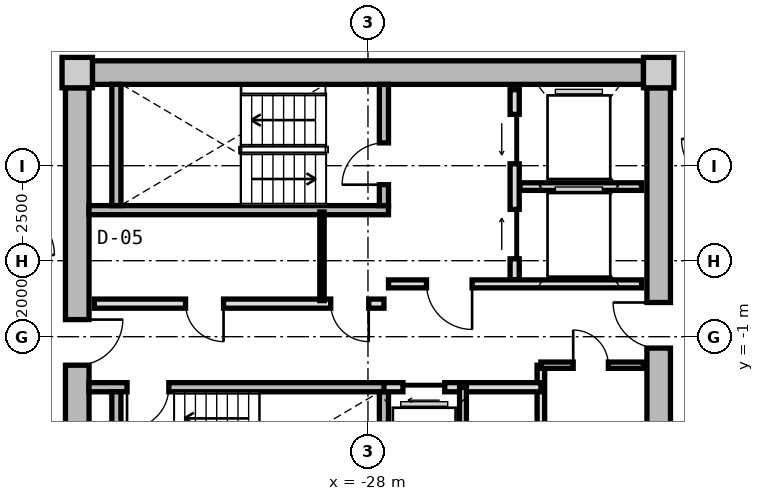
"""IFC4 building model, lengths in metres.
Left out: names, types, materials, properties, quantities, classifications, styles, units other than length and angle.
Written with IfcOpenShell. Run it as: python <this file> out.ifc"""

import sys

from ifc_helpers import new_model, si_unit, direction, frame, frame_2d, origin, origin_2d, place, context, subcontext, project, spatial, rectangle, extrude, source, transform, mapped, element, fill, save


model = new_model("IFC4")
c1 = context("Model", 3, precision=1e-05, world=origin(), true_north=direction((0.0, 1.0)))
c2 = subcontext(c1, "Body", "Model", "MODEL_VIEW")
j1 = project(units=[si_unit("LENGTHUNIT", "METRE"), si_unit("PLANEANGLEUNIT", "RADIAN")], contexts=[c1])
p1 = place(None, origin())
s1 = spatial("IfcSite", under=j1, at=p1, CompositionType="ELEMENT")
p2 = place(p1, origin())
s2 = spatial("IfcBuilding", under=s1, at=p2, CompositionType="ELEMENT")
p3 = place(p2, frame((0.0, 0.0, 137.35)))
s3 = spatial("IfcBuildingStorey", under=s2, at=p3, CompositionType="ELEMENT", Elevation=137.35)
m1 = source(origin(), c2, "Body", "SweptSolid", [
    extrude(rectangle(XDim=0.8, YDim=0.8, at=origin_2d()), origin(), (0.0, 0.0, 1.0), 3.05),
])
for number, where, z_axis, x_axis in (
    (1, (-20.35, 5.95, 0.0), (0.0, 0.0, 1.0), (1.0, 0.0, 0.0)),
    (2, (-35.65, 5.95, 0.0), (0.0, 0.0, 1.0), (1.0, 0.0, 0.0)),
):
    element("IfcColumn", number, at=place(p3, frame(where, z_axis=z_axis, x_axis=x_axis)), inside=s3, PredefinedType="COLUMN", context=c2, shape_type="MappedRepresentation", body=[
        mapped(m1, transform((0.0, 0.0, 0.0), x_axis=(1.0, 0.0, 0.0), y_axis=(0.0, 1.0, 0.0), z_axis=(0.0, 0.0, 1.0), scale=1.0)),
    ])
m2 = source(origin(), c2, "Body", "SweptSolid", [
    extrude(rectangle(XDim=14.5, YDim=0.62, at=frame_2d((7.25, 0.0))), origin(), (0.0, 0.0, 1.0), 2.81),
])
p4 = place(p3, frame((-35.25, 5.95, 0.0), z_axis=(0.0, 0.0, 1.0), x_axis=(1.0, 0.0, 0.0)))
e3 = element("IfcWall", 3, at=p4, inside=s3, PredefinedType="SHEAR", context=c2, shape_type="MappedRepresentation", body=[
    mapped(m2, transform((0.0, 0.0, 0.0), x_axis=(1.0, 0.0, 0.0), y_axis=(0.0, 1.0, 0.0), z_axis=(0.0, 0.0, 1.0), scale=1.0)),
])
m3 = source(origin(), c2, "Body", "SweptSolid", [
    extrude(rectangle(XDim=11.1, YDim=0.62, at=frame_2d((5.55, 0.0))), origin(), (0.0, 0.0, 1.0), 2.81),
])
p5 = place(p3, frame((-35.65, -5.55, 0.0), z_axis=(0.0, 0.0, 1.0), x_axis=(0.0, 1.0, 0.0)))
e4 = element("IfcWall", 4, at=p5, inside=s3, PredefinedType="SHEAR", context=c2, shape_type="MappedRepresentation", body=[
    mapped(m3, transform((0.0, 0.0, 0.0), x_axis=(1.0, 0.0, 0.0), y_axis=(0.0, 1.0, 0.0), z_axis=(0.0, 0.0, 1.0), scale=1.0)),
])
p6 = place(p5, frame((3.8, 0.0, 0.0)))
e5 = element("IfcOpeningElement", 5, at=p6, cuts=e4, PredefinedType="OPENING", context=c2, shape_type="SweptSolid", body=[
    extrude(rectangle(XDim=1.2, YDim=2.15, at=frame_2d((0.6, 1.075))), frame((0.0, 0.32, 0.0), z_axis=(0.0, -1.0, 0.0), x_axis=(1.0, 0.0, 0.0)), (0.0, 0.0, 1.0), 0.64),
])
p7 = place(p3, frame((-20.35, 5.55, 0.0), z_axis=(0.0, 0.0, 1.0), x_axis=(0.0, -1.0, 0.0)))
e6 = element("IfcWall", 6, at=p7, inside=s3, PredefinedType="SHEAR", context=c2, shape_type="MappedRepresentation", body=[
    mapped(m3, transform((0.0, 0.0, 0.0), x_axis=(1.0, 0.0, 0.0), y_axis=(0.0, 1.0, 0.0), z_axis=(0.0, 0.0, 1.0), scale=1.0)),
])
p8 = place(p7, frame((5.65, 0.0, 0.0)))
e7 = element("IfcOpeningElement", 7, at=p8, cuts=e6, PredefinedType="OPENING", context=c2, shape_type="SweptSolid", body=[
    extrude(rectangle(XDim=1.2, YDim=2.15, at=frame_2d((0.6, 1.075))), frame((0.0, 0.32, 0.0), z_axis=(0.0, -1.0, 0.0), x_axis=(1.0, 0.0, 0.0)), (0.0, 0.0, 1.0), 0.64),
])
m4 = source(origin(), c2, "Body", "SweptSolid", [
    extrude(rectangle(XDim=7.88, YDim=0.24, at=frame_2d((3.94, 0.0))), origin(), (0.0, 0.0, 1.0), 2.81),
])
p9 = place(p3, frame((-35.34, 2.33, 0.0), z_axis=(0.0, 0.0, 1.0), x_axis=(1.0, 0.0, 0.0)))
e8 = element("IfcWall", 8, at=p9, inside=s3, PredefinedType="PARTITIONING", context=c2, shape_type="MappedRepresentation", body=[
    mapped(m4, transform((0.0, 0.0, 0.0), x_axis=(1.0, 0.0, 0.0), y_axis=(0.0, 1.0, 0.0), z_axis=(0.0, 0.0, 1.0), scale=1.0)),
])
m5 = source(origin(), c2, "Body", "SweptSolid", [
    extrude(rectangle(XDim=3.19, YDim=0.24, at=frame_2d((1.595, 0.0))), origin(), (0.0, 0.0, 1.0), 2.81),
])
p10 = place(p3, frame((-34.62, 2.45, 0.0), z_axis=(0.0, 0.0, 1.0), x_axis=(0.0, 1.0, 0.0)))
e9 = element("IfcWall", 9, at=p10, inside=s3, PredefinedType="PARTITIONING", context=c2, shape_type="MappedRepresentation", body=[
    mapped(m5, transform((0.0, 0.0, 0.0), x_axis=(1.0, 0.0, 0.0), y_axis=(0.0, 1.0, 0.0), z_axis=(0.0, 0.0, 1.0), scale=1.0)),
])
p11 = place(p3, frame((-27.58, 2.45, 0.0), z_axis=(0.0, 0.0, 1.0), x_axis=(0.0, 1.0, 0.0)))
e10 = element("IfcWall", 10, at=p11, inside=s3, PredefinedType="PARTITIONING", context=c2, shape_type="MappedRepresentation", body=[
    mapped(m5, transform((0.0, 0.0, 0.0), x_axis=(1.0, 0.0, 0.0), y_axis=(0.0, 1.0, 0.0), z_axis=(0.0, 0.0, 1.0), scale=1.0)),
])
p12 = place(p11, frame((0.55, 0.0, 0.0)))
e11 = element("IfcOpeningElement", 11, at=p12, cuts=e10, PredefinedType="OPENING", context=c2, shape_type="SweptSolid", body=[
    extrude(rectangle(XDim=1.1, YDim=2.15, at=frame_2d((0.55, 1.075))), frame((0.0, 0.13, 0.0), z_axis=(0.0, -1.0, 0.0), x_axis=(1.0, 0.0, 0.0)), (0.0, 0.0, 1.0), 0.26),
])
p13 = place(p3, frame((-35.34, -2.33, 0.0), z_axis=(0.0, 0.0, 1.0), x_axis=(1.0, 0.0, 0.0)))
e12 = element("IfcWall", 12, at=p13, inside=s3, PredefinedType="PARTITIONING", context=c2, shape_type="MappedRepresentation", body=[
    mapped(m4, transform((0.0, 0.0, 0.0), x_axis=(1.0, 0.0, 0.0), y_axis=(0.0, 1.0, 0.0), z_axis=(0.0, 0.0, 1.0), scale=1.0)),
])
p14 = place(p13, frame((1.0, 0.0, 0.0)))
e13 = element("IfcOpeningElement", 13, at=p14, cuts=e12, PredefinedType="OPENING", context=c2, shape_type="SweptSolid", body=[
    extrude(rectangle(XDim=1.1, YDim=2.15, at=frame_2d((0.55, 1.075))), frame((0.0, 0.13, 0.0), z_axis=(0.0, -1.0, 0.0), x_axis=(1.0, 0.0, 0.0)), (0.0, 0.0, 1.0), 0.26),
])
for number, where, z_axis, x_axis in (
    (14, (-34.62, -5.64, 0.0), (0.0, 0.0, 1.0), (0.0, 1.0, 0.0)),
    (15, (-27.58, -5.64, 0.0), (0.0, 0.0, 1.0), (0.0, 1.0, 0.0)),
):
    element("IfcWall", number, at=place(p3, frame(where, z_axis=z_axis, x_axis=x_axis)), inside=s3, PredefinedType="PARTITIONING", context=c2, shape_type="MappedRepresentation", body=[
        mapped(m5, transform((0.0, 0.0, 0.0), x_axis=(1.0, 0.0, 0.0), y_axis=(0.0, 1.0, 0.0), z_axis=(0.0, 0.0, 1.0), scale=1.0)),
    ])
m6 = source(origin(), c2, "Body", "SweptSolid", [
    extrude(rectangle(XDim=5.0, YDim=0.24, at=frame_2d((2.5, 0.0))), origin(), (0.0, 0.0, 1.0), 2.795),
])
p15 = place(p3, frame((-24.14, 0.5, 0.0), z_axis=(0.0, 0.0, 1.0), x_axis=(0.0, 1.0, 0.0)))
e16 = element("IfcWall", 16, at=p15, inside=s3, PredefinedType="PARTITIONING", context=c2, shape_type="MappedRepresentation", body=[
    mapped(m6, transform((0.0, 0.0, 0.0), x_axis=(1.0, 0.0, 0.0), y_axis=(0.0, 1.0, 0.0), z_axis=(0.0, 0.0, 1.0), scale=1.0)),
])
p16 = place(p15, frame((3.05, 0.0, 0.0)))
e17 = element("IfcOpeningElement", 17, at=p16, cuts=e16, PredefinedType="OPENING", context=c2, shape_type="SweptSolid", body=[
    extrude(rectangle(XDim=1.3, YDim=2.2, at=frame_2d((0.65, 1.1))), frame((0.0, 0.13, 0.0), z_axis=(0.0, -1.0, 0.0), x_axis=(1.0, 0.0, 0.0)), (0.0, 0.0, 1.0), 0.26),
])
p17 = place(p15, frame((0.55, 0.0, 0.0)))
e18 = element("IfcOpeningElement", 18, at=p17, cuts=e16, PredefinedType="OPENING", context=c2, shape_type="SweptSolid", body=[
    extrude(rectangle(XDim=1.3, YDim=2.2, at=frame_2d((0.65, 1.1))), frame((0.0, 0.13, 0.0), z_axis=(0.0, -1.0, 0.0), x_axis=(1.0, 0.0, 0.0)), (0.0, 0.0, 1.0), 0.26),
])
m7 = source(origin(), c2, "Body", "SweptSolid", [
    extrude(rectangle(XDim=3.2, YDim=0.2, at=frame_2d((1.6, 0.0))), origin(), (0.0, 0.0, 1.0), 2.795),
])
p18 = place(p3, frame((-24.0, 2.95, 0.0), z_axis=(0.0, 0.0, 1.0), x_axis=(1.0, 0.0, 0.0)))
e19 = element("IfcWall", 19, at=p18, inside=s3, PredefinedType="PARTITIONING", context=c2, shape_type="MappedRepresentation", body=[
    mapped(m7, transform((0.0, 0.0, 0.0), x_axis=(1.0, 0.0, 0.0), y_axis=(0.0, 1.0, 0.0), z_axis=(0.0, 0.0, 1.0), scale=1.0)),
])
m8 = source(origin(), c2, "Body", "SweptSolid", [
    extrude(rectangle(XDim=6.66, YDim=0.21, at=frame_2d((3.33, 0.0))), origin(), (0.0, 0.0, 1.0), 2.795),
])
p19 = place(p3, frame((-27.46, 0.39, 0.0), z_axis=(0.0, 0.0, 1.0), x_axis=(1.0, 0.0, 0.0)))
e20 = element("IfcWall", 20, at=p19, inside=s3, PredefinedType="PARTITIONING", context=c2, shape_type="MappedRepresentation", body=[
    mapped(m8, transform((0.0, 0.0, 0.0), x_axis=(1.0, 0.0, 0.0), y_axis=(0.0, 1.0, 0.0), z_axis=(0.0, 0.0, 1.0), scale=1.0)),
])
p20 = place(p19, frame((1.0, 0.0, 0.0)))
e21 = element("IfcOpeningElement", 21, at=p20, cuts=e20, PredefinedType="OPENING", context=c2, shape_type="SweptSolid", body=[
    extrude(rectangle(XDim=1.2, YDim=2.15, at=frame_2d((0.6, 1.075))), frame((0.0, 0.115, 0.0), z_axis=(0.0, -1.0, 0.0), x_axis=(1.0, 0.0, 0.0)), (0.0, 0.0, 1.0), 0.23),
])
m9 = source(origin(), c2, "Body", "SweptSolid", [
    extrude(rectangle(XDim=7.62, YDim=0.24, at=frame_2d((3.81, 0.0))), origin(), (0.0, 0.0, 1.0), 2.795),
])
p21 = place(p3, frame((-35.2, -0.13, 0.0), z_axis=(0.0, 0.0, 1.0), x_axis=(1.0, 0.0, 0.0)))
e22 = element("IfcWall", 22, at=p21, inside=s3, PredefinedType="PARTITIONING", context=c2, shape_type="MappedRepresentation", body=[
    mapped(m9, transform((0.0, 0.0, 0.0), x_axis=(1.0, 0.0, 0.0), y_axis=(0.0, 1.0, 0.0), z_axis=(0.0, 0.0, 1.0), scale=1.0)),
])
p22 = place(p21, frame((6.22, 0.0, 0.0)))
e23 = element("IfcOpeningElement", 23, at=p22, cuts=e22, PredefinedType="OPENING", context=c2, shape_type="SweptSolid", body=[
    extrude(rectangle(XDim=1.0, YDim=2.1, at=frame_2d((0.5, 1.05))), frame((0.0, 0.13, 0.0), z_axis=(0.0, -1.0, 0.0), x_axis=(1.0, 0.0, 0.0)), (0.0, 0.0, 1.0), 0.26),
])
p23 = place(p21, frame((2.4, 0.0, 0.0)))
e24 = element("IfcOpeningElement", 24, at=p23, cuts=e22, PredefinedType="OPENING", context=c2, shape_type="SweptSolid", body=[
    extrude(rectangle(XDim=1.0, YDim=2.1, at=frame_2d((0.5, 1.05))), frame((0.0, 0.13, 0.0), z_axis=(0.0, -1.0, 0.0), x_axis=(1.0, 0.0, 0.0)), (0.0, 0.0, 1.0), 0.26),
])
m10 = source(origin(), c2, "Body", "SweptSolid", [
    extrude(rectangle(XDim=2.33, YDim=0.115, at=frame_2d((1.165, 0.0))), origin(), (0.0, 0.0, 1.0), 2.795),
])
p24 = place(p3, frame((-29.21, -0.05, 0.0), z_axis=(0.0, 0.0, 1.0), x_axis=(0.0, 1.0, 0.0)))
e25 = element("IfcWall", 25, at=p24, inside=s3, PredefinedType="PARTITIONING", context=c2, shape_type="MappedRepresentation", body=[
    mapped(m10, transform((0.0, 0.0, 0.0), x_axis=(1.0, 0.0, 0.0), y_axis=(0.0, 1.0, 0.0), z_axis=(0.0, 0.0, 1.0), scale=1.0)),
])
m11 = source(origin(), c2, "Body", "SweptSolid", [
    extrude(rectangle(XDim=3.8, YDim=0.2, at=frame_2d((1.9, 0.0))), origin(), (0.0, 0.0, 1.0), 2.795),
])
p25 = place(p3, frame((-23.45, -5.55, 0.0), z_axis=(0.0, 0.0, 1.0), x_axis=(0.0, 1.0, 0.0)))
e26 = element("IfcWall", 26, at=p25, inside=s3, PredefinedType="PARTITIONING", context=c2, shape_type="MappedRepresentation", body=[
    mapped(m11, transform((0.0, 0.0, 0.0), x_axis=(1.0, 0.0, 0.0), y_axis=(0.0, 1.0, 0.0), z_axis=(0.0, 0.0, 1.0), scale=1.0)),
])
m12 = source(origin(), c2, "Body", "SweptSolid", [
    extrude(rectangle(XDim=4.13, YDim=0.24, at=frame_2d((2.065, 0.0))), origin(), (0.0, 0.0, 1.0), 2.795),
])
p26 = place(p3, frame((-27.58, -2.33, 0.0), z_axis=(0.0, 0.0, 1.0), x_axis=(1.0, 0.0, 0.0)))
e27 = element("IfcWall", 27, at=p26, inside=s3, PredefinedType="PARTITIONING", context=c2, shape_type="MappedRepresentation", body=[
    mapped(m12, transform((0.0, 0.0, 0.0), x_axis=(1.0, 0.0, 0.0), y_axis=(0.0, 1.0, 0.0), z_axis=(0.0, 0.0, 1.0), scale=1.0)),
])
p27 = place(p26, frame((0.5, 0.0, 0.0)))
e28 = element("IfcOpeningElement", 28, at=p27, cuts=e27, PredefinedType="OPENING", context=c2, shape_type="SweptSolid", body=[
    extrude(rectangle(XDim=1.1, YDim=2.2, at=frame_2d((0.55, 1.1))), frame((0.0, 0.13, 0.0), z_axis=(0.0, -1.0, 0.0), x_axis=(1.0, 0.0, 0.0)), (0.0, 0.0, 1.0), 0.26),
])
m13 = source(origin(), c2, "Body", "SweptSolid", [
    extrude(rectangle(XDim=3.22, YDim=0.18, at=frame_2d((1.61, 0.0))), origin(), (0.0, 0.0, 1.0), 2.795),
])
p28 = place(p3, frame((-25.5, -5.55, 0.0), z_axis=(0.0, 0.0, 1.0), x_axis=(0.0, 1.0, 0.0)))
e29 = element("IfcWall", 29, at=p28, inside=s3, PredefinedType="PARTITIONING", context=c2, shape_type="MappedRepresentation", body=[
    mapped(m13, transform((0.0, 0.0, 0.0), x_axis=(1.0, 0.0, 0.0), y_axis=(0.0, 1.0, 0.0), z_axis=(0.0, 0.0, 1.0), scale=1.0)),
])
m14 = source(origin(), c2, "Body", "SweptSolid", [
    extrude(rectangle(XDim=2.7, YDim=0.165, at=frame_2d((1.35, 0.0))), origin(), (0.0, 0.0, 1.0), 2.795),
])
p29 = place(p3, frame((-23.45, -1.75, 0.0), z_axis=(0.0, 0.0, 1.0), x_axis=(1.0, 0.0, 0.0)))
e30 = element("IfcWall", 30, at=p29, inside=s3, PredefinedType="PARTITIONING", context=c2, shape_type="MappedRepresentation", body=[
    mapped(m14, transform((0.0, 0.0, 0.0), x_axis=(1.0, 0.0, 0.0), y_axis=(0.0, 1.0, 0.0), z_axis=(0.0, 0.0, 1.0), scale=1.0)),
])
p30 = place(p29, frame((0.85, 0.0, 0.0)))
e31 = element("IfcOpeningElement", 31, at=p30, cuts=e30, PredefinedType="OPENING", context=c2, shape_type="SweptSolid", body=[
    extrude(rectangle(XDim=0.925, YDim=2.1, at=frame_2d((0.462, 1.05))), frame((0.0, 0.093, 0.0), z_axis=(0.0, -1.0, 0.0), x_axis=(1.0, 0.0, 0.0)), (0.0, 0.0, 1.0), 0.185),
])
m15 = source(origin(), c2, "Body", "SweptSolid", [
    extrude(rectangle(XDim=1.1, YDim=2.15, at=frame_2d((0.55, 1.075))), frame((0.0, 0.025, 0.0), z_axis=(0.0, -1.0, 0.0), x_axis=(1.0, 0.0, 0.0)), (0.0, 0.0, 1.0), 0.05),
])
p31 = place(p12, origin())
e32 = element("IfcDoor", 32, at=p31, inside=s3, OperationType="SINGLE_SWING_LEFT", PredefinedType="DOOR", context=c2, shape_type="MappedRepresentation", body=[
    mapped(m15, transform((0.0, 0.0, 0.0), x_axis=(1.0, 0.0, 0.0), y_axis=(0.0, 1.0, 0.0), z_axis=(0.0, 0.0, 1.0), scale=1.0)),
])
fill(e11, e32)
p32 = place(p14, frame((1.1, 0.0, 0.0), z_axis=(0.0, 0.0, 1.0), x_axis=(-1.0, 0.0, 0.0)))
e33 = element("IfcDoor", 33, at=p32, inside=s3, OperationType="SINGLE_SWING_RIGHT", PredefinedType="DOOR", context=c2, shape_type="MappedRepresentation", body=[
    mapped(m15, transform((0.0, 0.0, 0.0), x_axis=(1.0, 0.0, 0.0), y_axis=(0.0, 1.0, 0.0), z_axis=(0.0, 0.0, 1.0), scale=1.0)),
])
fill(e13, e33)
m16 = source(origin(), c2, "Body", "SweptSolid", [
    extrude(rectangle(XDim=1.3, YDim=2.2, at=frame_2d((0.65, 1.1))), frame((0.0, 0.025, 0.0), z_axis=(0.0, -1.0, 0.0), x_axis=(1.0, 0.0, 0.0)), (0.0, 0.0, 1.0), 0.05),
])
p33 = place(p16, origin())
e34 = element("IfcDoor", 34, at=p33, inside=s3, OperationType="SLIDING_TO_LEFT", PredefinedType="DOOR", context=c2, shape_type="MappedRepresentation", body=[
    mapped(m16, transform((0.0, 0.0, 0.0), x_axis=(1.0, 0.0, 0.0), y_axis=(0.0, 1.0, 0.0), z_axis=(0.0, 0.0, 1.0), scale=1.0)),
])
fill(e17, e34)
p34 = place(p17, origin())
e35 = element("IfcDoor", 35, at=p34, inside=s3, OperationType="SLIDING_TO_RIGHT", PredefinedType="DOOR", context=c2, shape_type="MappedRepresentation", body=[
    mapped(m16, transform((0.0, 0.0, 0.0), x_axis=(1.0, 0.0, 0.0), y_axis=(0.0, 1.0, 0.0), z_axis=(0.0, 0.0, 1.0), scale=1.0)),
])
fill(e18, e35)
m17 = source(origin(), c2, "Body", "SweptSolid", [
    extrude(rectangle(XDim=1.2, YDim=2.15, at=frame_2d((0.6, 1.075))), frame((0.0, 0.025, 0.0), z_axis=(0.0, -1.0, 0.0), x_axis=(1.0, 0.0, 0.0)), (0.0, 0.0, 1.0), 0.05),
])
p35 = place(p20, frame((1.2, 0.0, 0.0), z_axis=(0.0, 0.0, 1.0), x_axis=(-1.0, 0.0, 0.0)))
e36 = element("IfcDoor", 36, at=p35, inside=s3, OperationType="SINGLE_SWING_LEFT", PredefinedType="DOOR", context=c2, shape_type="MappedRepresentation", body=[
    mapped(m17, transform((0.0, 0.0, 0.0), x_axis=(1.0, 0.0, 0.0), y_axis=(0.0, 1.0, 0.0), z_axis=(0.0, 0.0, 1.0), scale=1.0)),
])
fill(e21, e36)
p36 = place(p6, frame((1.2, 0.0, 0.0), z_axis=(0.0, 0.0, 1.0), x_axis=(-1.0, 0.0, 0.0)))
e37 = element("IfcDoor", 37, at=p36, inside=s3, OperationType="SINGLE_SWING_LEFT", PredefinedType="DOOR", context=c2, shape_type="MappedRepresentation", body=[
    mapped(m17, transform((0.0, 0.0, 0.0), x_axis=(1.0, 0.0, 0.0), y_axis=(0.0, 1.0, 0.0), z_axis=(0.0, 0.0, 1.0), scale=1.0)),
])
fill(e5, e37)
p37 = place(p8, frame((1.2, 0.0, 0.0), z_axis=(0.0, 0.0, 1.0), x_axis=(-1.0, 0.0, 0.0)))
e38 = element("IfcDoor", 38, at=p37, inside=s3, OperationType="SINGLE_SWING_RIGHT", PredefinedType="DOOR", context=c2, shape_type="MappedRepresentation", body=[
    mapped(m17, transform((0.0, 0.0, 0.0), x_axis=(1.0, 0.0, 0.0), y_axis=(0.0, 1.0, 0.0), z_axis=(0.0, 0.0, 1.0), scale=1.0)),
])
fill(e7, e38)
m18 = source(origin(), c2, "Body", "SweptSolid", [
    extrude(rectangle(XDim=1.0, YDim=2.1, at=frame_2d((0.5, 1.05))), frame((0.0, 0.025, 0.0), z_axis=(0.0, -1.0, 0.0), x_axis=(1.0, 0.0, 0.0)), (0.0, 0.0, 1.0), 0.05),
])
p38 = place(p22, frame((1.0, 0.0, 0.0), z_axis=(0.0, 0.0, 1.0), x_axis=(-1.0, 0.0, 0.0)))
e39 = element("IfcDoor", 39, at=p38, inside=s3, OperationType="SINGLE_SWING_LEFT", PredefinedType="DOOR", context=c2, shape_type="MappedRepresentation", body=[
    mapped(m18, transform((0.0, 0.0, 0.0), x_axis=(1.0, 0.0, 0.0), y_axis=(0.0, 1.0, 0.0), z_axis=(0.0, 0.0, 1.0), scale=1.0)),
])
fill(e23, e39)
p39 = place(p23, frame((1.0, 0.0, 0.0), z_axis=(0.0, 0.0, 1.0), x_axis=(-1.0, 0.0, 0.0)))
e40 = element("IfcDoor", 40, at=p39, inside=s3, OperationType="SINGLE_SWING_LEFT", PredefinedType="DOOR", context=c2, shape_type="MappedRepresentation", body=[
    mapped(m18, transform((0.0, 0.0, 0.0), x_axis=(1.0, 0.0, 0.0), y_axis=(0.0, 1.0, 0.0), z_axis=(0.0, 0.0, 1.0), scale=1.0)),
])
fill(e24, e40)
m19 = source(origin(), c2, "Body", "SweptSolid", [
    extrude(rectangle(XDim=1.1, YDim=2.2, at=frame_2d((0.55, 1.1))), frame((0.0, 0.025, 0.0), z_axis=(0.0, -1.0, 0.0), x_axis=(1.0, 0.0, 0.0)), (0.0, 0.0, 1.0), 0.05),
])
p40 = place(p27, frame((1.1, 0.0, 0.0), z_axis=(0.0, 0.0, 1.0), x_axis=(-1.0, 0.0, 0.0)))
e41 = element("IfcDoor", 41, at=p40, inside=s3, OperationType="SLIDING_TO_LEFT", PredefinedType="DOOR", context=c2, shape_type="MappedRepresentation", body=[
    mapped(m19, transform((0.0, 0.0, 0.0), x_axis=(1.0, 0.0, 0.0), y_axis=(0.0, 1.0, 0.0), z_axis=(0.0, 0.0, 1.0), scale=1.0)),
])
fill(e28, e41)
m20 = source(origin(), c2, "Body", "SweptSolid", [
    extrude(rectangle(XDim=0.925, YDim=2.1, at=frame_2d((0.462, 1.05))), frame((0.0, 0.025, 0.0), z_axis=(0.0, -1.0, 0.0), x_axis=(1.0, 0.0, 0.0)), (0.0, 0.0, 1.0), 0.05),
])
p41 = place(p30, origin())
e42 = element("IfcDoor", 42, at=p41, inside=s3, OperationType="SINGLE_SWING_LEFT", PredefinedType="DOOR", context=c2, shape_type="MappedRepresentation", body=[
    mapped(m20, transform((0.0, 0.0, 0.0), x_axis=(1.0, 0.0, 0.0), y_axis=(0.0, 1.0, 0.0), z_axis=(0.0, 0.0, 1.0), scale=1.0)),
])
fill(e31, e42)
save(model, sys.argv[1])
